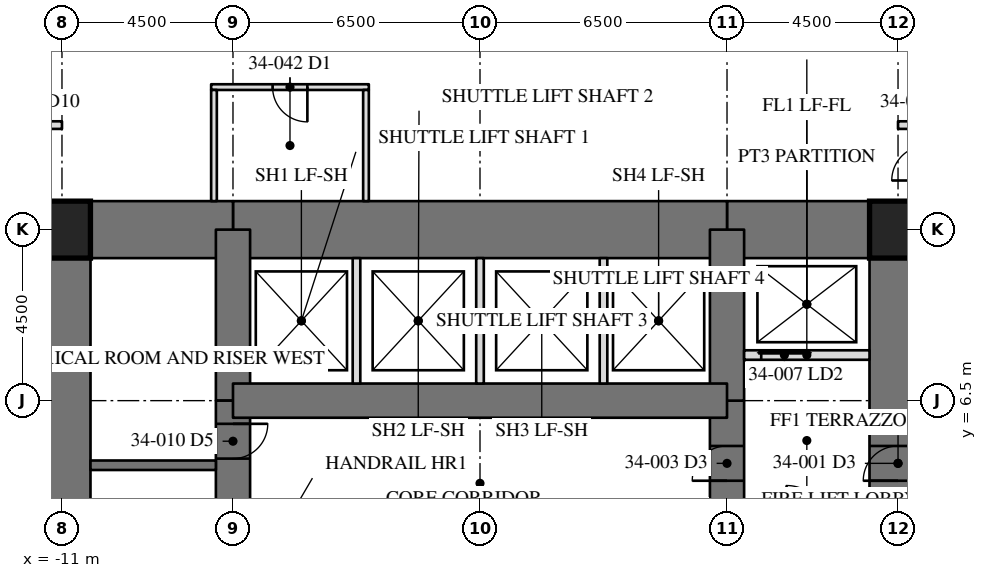
"""IFC4 building model, lengths in metres.
Left out: names, types, materials, properties, quantities, classifications, styles, units other than length and angle.
Written with IfcOpenShell. Run it as: python <this file> out.ifc"""

import sys

from ifc_helpers import new_model, si_unit, direction, frame, frame_2d, origin, origin_2d, place, context, subcontext, project, spatial, rectangle, hollow_rectangle, extrude, element, fill, save


model = new_model("IFC4")
c1 = context("Model", 3, precision=1e-05, world=origin(), true_north=direction((0.0, 1.0)))
c2 = subcontext(c1, "Body", "Model", "MODEL_VIEW")
j1 = project(units=[si_unit("LENGTHUNIT", "METRE"), si_unit("PLANEANGLEUNIT", "RADIAN")], contexts=[c1])
p1 = place(None, origin())
s1 = spatial("IfcSite", under=j1, at=p1, CompositionType="ELEMENT")
p2 = place(p1, origin())
s2 = spatial("IfcBuilding", under=s1, at=p2, CompositionType="ELEMENT")
p3 = place(p2, frame((0.0, 0.0, 145.9)))
s3 = spatial("IfcBuildingStorey", under=s2, at=p3, CompositionType="ELEMENT", Elevation=145.9)
p4 = place(p3, frame((11.0, -11.0, 0.0), z_axis=(0.0, 0.0, 1.0), x_axis=(0.0, 1.0, 0.0)))
e1 = element("IfcWall", 1, at=p4, inside=s3, PredefinedType="SHEAR", context=c2, shape_type="SweptSolid", body=[
    extrude(rectangle(XDim=22.0, YDim=1.5, at=frame_2d((11.0, 0.0))), origin(), (0.0, 0.0, 1.0), 4.1),
])
p5 = place(p4, frame((15.393, 0.0, 0.0)))
e2 = element("IfcOpeningElement", 2, at=p5, cuts=e1, PredefinedType="OPENING", context=c2, shape_type="SweptSolid", body=[
    extrude(rectangle(XDim=0.915, YDim=2.134, at=frame_2d((0.458, 1.067))), frame((0.0, 0.76, 0.0), z_axis=(0.0, -1.0, 0.0), x_axis=(1.0, 0.0, 0.0)), (0.0, 0.0, 1.0), 1.52),
])
p6 = place(p3, frame((-11.0, 11.0, 0.0), z_axis=(0.0, 0.0, 1.0), x_axis=(0.0, -1.0, 0.0)))
e3 = element("IfcWall", 3, at=p6, inside=s3, PredefinedType="SHEAR", context=c2, shape_type="SweptSolid", body=[
    extrude(rectangle(XDim=22.0, YDim=1.5, at=frame_2d((11.0, 0.0))), origin(), (0.0, 0.0, 1.0), 4.1),
])
p7 = place(p6, frame((15.393, 0.0, 0.0)))
e4 = element("IfcOpeningElement", 4, at=p7, cuts=e3, PredefinedType="OPENING", context=c2, shape_type="SweptSolid", body=[
    extrude(rectangle(XDim=0.915, YDim=2.134, at=frame_2d((0.458, 1.067))), frame((0.0, 0.76, 0.0), z_axis=(0.0, -1.0, 0.0), x_axis=(1.0, 0.0, 0.0)), (0.0, 0.0, 1.0), 1.52),
])
p8 = place(p3, frame((11.0, 11.0, 0.0), z_axis=(0.0, 0.0, 1.0), x_axis=(-1.0, 0.0, 0.0)))
e5 = element("IfcWall", 5, at=p8, inside=s3, PredefinedType="SHEAR", context=c2, shape_type="SweptSolid", body=[
    extrude(rectangle(XDim=4.5, YDim=1.5, at=frame_2d((2.25, 0.0))), origin(), (0.0, 0.0, 1.0), 4.1),
])
p9 = place(p3, frame((6.5, 11.0, 0.0), z_axis=(0.0, 0.0, 1.0), x_axis=(-1.0, 0.0, 0.0)))
e6 = element("IfcWall", 6, at=p9, inside=s3, PredefinedType="SHEAR", context=c2, shape_type="SweptSolid", body=[
    extrude(rectangle(XDim=13.0, YDim=1.5, at=frame_2d((6.5, 0.0))), origin(), (0.0, 0.0, 1.0), 4.1),
])
p10 = place(p3, frame((-6.5, 11.0, 0.0), z_axis=(0.0, 0.0, 1.0), x_axis=(-1.0, 0.0, 0.0)))
e7 = element("IfcWall", 7, at=p10, inside=s3, PredefinedType="SHEAR", context=c2, shape_type="SweptSolid", body=[
    extrude(rectangle(XDim=4.5, YDim=1.5, at=frame_2d((2.25, 0.0))), origin(), (0.0, 0.0, 1.0), 4.1),
])
p11 = place(p3, frame((6.5, -6.5, 0.0), z_axis=(0.0, 0.0, 1.0), x_axis=(0.0, 1.0, 0.0)))
e8 = element("IfcWall", 8, at=p11, inside=s3, PredefinedType="SHEAR", context=c2, shape_type="SweptSolid", body=[
    extrude(rectangle(XDim=13.0, YDim=0.9, at=frame_2d((6.5, 0.0))), origin(), (0.0, 0.0, 1.0), 4.1),
])
p12 = place(p11, frame((10.893, 0.0, 0.0)))
e9 = element("IfcOpeningElement", 9, at=p12, cuts=e8, PredefinedType="OPENING", context=c2, shape_type="SweptSolid", body=[
    extrude(rectangle(XDim=0.915, YDim=2.134, at=frame_2d((0.458, 1.067))), frame((0.0, 0.46, 0.0), z_axis=(0.0, -1.0, 0.0), x_axis=(1.0, 0.0, 0.0)), (0.0, 0.0, 1.0), 0.92),
])
p13 = place(p11, frame((0.61, 0.0, 0.0)))
e10 = element("IfcOpeningElement", 10, at=p13, cuts=e8, PredefinedType="OPENING", context=c2, shape_type="SweptSolid", body=[
    extrude(rectangle(XDim=0.915, YDim=2.134, at=frame_2d((0.458, 1.067))), frame((0.0, 0.46, 0.0), z_axis=(0.0, -1.0, 0.0), x_axis=(1.0, 0.0, 0.0)), (0.0, 0.0, 1.0), 0.92),
])
for number, where, z_axis, x_axis in (
    (11, (6.5, 6.5, 0.0), (0.0, 0.0, 1.0), (0.0, 1.0, 0.0)),
    (12, (-6.5, 11.0, 0.0), (0.0, 0.0, 1.0), (0.0, -1.0, 0.0)),
):
    element("IfcWall", number, at=place(p3, frame(where, z_axis=z_axis, x_axis=x_axis)), inside=s3, PredefinedType="SHEAR", context=c2, shape_type="SweptSolid", body=[
        extrude(rectangle(XDim=4.5, YDim=0.9, at=frame_2d((2.25, 0.0))), origin(), (0.0, 0.0, 1.0), 4.1),
    ])
p14 = place(p3, frame((-6.5, 6.5, 0.0), z_axis=(0.0, 0.0, 1.0), x_axis=(0.0, -1.0, 0.0)))
e13 = element("IfcWall", 13, at=p14, inside=s3, PredefinedType="SHEAR", context=c2, shape_type="SweptSolid", body=[
    extrude(rectangle(XDim=13.0, YDim=0.9, at=frame_2d((6.5, 0.0))), origin(), (0.0, 0.0, 1.0), 4.1),
])
p15 = place(p14, frame((10.893, 0.0, 0.0)))
e14 = element("IfcOpeningElement", 14, at=p15, cuts=e13, PredefinedType="OPENING", context=c2, shape_type="SweptSolid", body=[
    extrude(rectangle(XDim=0.915, YDim=2.134, at=frame_2d((0.458, 1.067))), frame((0.0, 0.46, 0.0), z_axis=(0.0, -1.0, 0.0), x_axis=(1.0, 0.0, 0.0)), (0.0, 0.0, 1.0), 0.92),
])
p16 = place(p14, frame((0.61, 0.0, 0.0)))
e15 = element("IfcOpeningElement", 15, at=p16, cuts=e13, PredefinedType="OPENING", context=c2, shape_type="SweptSolid", body=[
    extrude(rectangle(XDim=0.915, YDim=2.134, at=frame_2d((0.458, 1.067))), frame((0.0, 0.46, 0.0), z_axis=(0.0, -1.0, 0.0), x_axis=(1.0, 0.0, 0.0)), (0.0, 0.0, 1.0), 0.92),
])
p17 = place(p3, frame((6.5, 6.5, 0.0), z_axis=(0.0, 0.0, 1.0), x_axis=(-1.0, 0.0, 0.0)))
e16 = element("IfcWall", 16, at=p17, inside=s3, PredefinedType="SHEAR", context=c2, shape_type="SweptSolid", body=[
    extrude(rectangle(XDim=13.0, YDim=0.9, at=frame_2d((6.5, 0.0))), origin(), (0.0, 0.0, 1.0), 4.1),
])
for number, where, z_axis, x_axis in (
    (17, (11.0, 11.0, 0.0), (0.0, 0.0, 1.0), (1.0, 0.0, 0.0)),
    (18, (-11.0, 11.0, 0.0), (0.0, 0.0, 1.0), (1.0, 0.0, 0.0)),
):
    element("IfcColumn", number, at=place(p3, frame(where, z_axis=z_axis, x_axis=x_axis)), inside=s3, PredefinedType="COLUMN", context=c2, shape_type="SweptSolid", body=[
        extrude(hollow_rectangle(XDim=1.499, YDim=1.499, WallThickness=0.102, at=origin_2d()), origin(), (0.0, 0.0, 1.0), 4.1),
    ])
p18 = place(p3, frame((-6.95, 4.8, 0.0), z_axis=(0.0, 0.0, 1.0), x_axis=(-1.0, 0.0, 0.0)))
e19 = element("IfcWall", 19, at=p18, inside=s3, PredefinedType="SOLIDWALL", context=c2, shape_type="SweptSolid", body=[
    extrude(rectangle(XDim=3.3, YDim=0.25, at=frame_2d((1.65, 0.0))), origin(), (0.0, 0.0, 1.0), 3.91),
])
p19 = place(p3, frame((6.95, 7.7, 0.0), z_axis=(0.0, 0.0, 1.0), x_axis=(1.0, 0.0, 0.0)))
e20 = element("IfcWall", 20, at=p19, inside=s3, PredefinedType="PARTITIONING", context=c2, shape_type="SweptSolid", body=[
    extrude(rectangle(XDim=3.3, YDim=0.25, at=frame_2d((1.65, 0.0))), origin(), (0.0, 0.0, 1.0), 3.91),
])
p20 = place(p19, frame((0.45, 0.0, 0.0)))
e21 = element("IfcOpeningElement", 21, at=p20, cuts=e20, PredefinedType="OPENING", context=c2, shape_type="SweptSolid", body=[
    extrude(rectangle(XDim=1.219, YDim=2.134, at=frame_2d((0.609, 1.067))), frame((0.0, 0.135, 0.0), z_axis=(0.0, -1.0, 0.0), x_axis=(1.0, 0.0, 0.0)), (0.0, 0.0, 1.0), 0.27),
])
for number, where, z_axis, x_axis in (
    (22, (-3.25, 6.95, 0.0), (0.0, 0.0, 1.0), (0.0, 1.0, 0.0)),
    (23, (0.0, 6.95, 0.0), (0.0, 0.0, 1.0), (0.0, 1.0, 0.0)),
    (24, (3.25, 6.95, 0.0), (0.0, 0.0, 1.0), (0.0, 1.0, 0.0)),
):
    element("IfcWall", number, at=place(p3, frame(where, z_axis=z_axis, x_axis=x_axis)), inside=s3, PredefinedType="PARTITIONING", context=c2, shape_type="SweptSolid", body=[
        extrude(rectangle(XDim=3.3, YDim=0.2, at=frame_2d((1.65, 0.0))), origin(), (0.0, 0.0, 1.0), 3.91),
    ])
for number, where, z_axis, x_axis in (
    (25, (11.0, 13.75, 0.0), (0.0, 0.0, 1.0), (1.0, 0.0, 0.0)),
    (26, (-11.0, 13.75, 0.0), (0.0, 0.0, 1.0), (-1.0, 0.0, 0.0)),
):
    element("IfcWall", number, at=place(p3, frame(where, z_axis=z_axis, x_axis=x_axis)), inside=s3, PredefinedType="PARTITIONING", context=c2, shape_type="SweptSolid", body=[
        extrude(rectangle(XDim=2.85, YDim=0.2, at=frame_2d((1.425, 0.0))), origin(), (0.0, 0.0, 1.0), 3.91),
    ])
p21 = place(p3, frame((-2.925, 14.75, 0.0), z_axis=(0.0, 0.0, 1.0), x_axis=(-1.0, 0.0, 0.0)))
e27 = element("IfcWall", 27, at=p21, inside=s3, PredefinedType="PARTITIONING", context=c2, shape_type="SweptSolid", body=[
    extrude(rectangle(XDim=4.15, YDim=0.15, at=frame_2d((2.075, 0.0))), origin(), (0.0, 0.0, 1.0), 3.91),
])
p22 = place(p21, frame((1.617, 0.0, 0.0)))
e28 = element("IfcOpeningElement", 28, at=p22, cuts=e27, PredefinedType="OPENING", context=c2, shape_type="SweptSolid", body=[
    extrude(rectangle(XDim=0.915, YDim=2.134, at=frame_2d((0.458, 1.067))), frame((0.0, 0.085, 0.0), z_axis=(0.0, -1.0, 0.0), x_axis=(1.0, 0.0, 0.0)), (0.0, 0.0, 1.0), 0.17),
])
for number, where, z_axis, x_axis in (
    (29, (-3.0, 14.675, 0.0), (0.0, 0.0, 1.0), (0.0, -1.0, 0.0)),
    (30, (-7.0, 14.675, 0.0), (0.0, 0.0, 1.0), (0.0, -1.0, 0.0)),
):
    element("IfcWall", number, at=place(p3, frame(where, z_axis=z_axis, x_axis=x_axis)), inside=s3, PredefinedType="PARTITIONING", context=c2, shape_type="SweptSolid", body=[
        extrude(rectangle(XDim=2.925, YDim=0.15, at=frame_2d((1.462, 0.0))), origin(), (0.0, 0.0, 1.0), 3.91),
    ])
p23 = place(p12, origin())
e31 = element("IfcDoor", 31, at=p23, inside=s3, OperationType="SINGLE_SWING_RIGHT", PredefinedType="DOOR", context=c2, shape_type="SweptSolid", body=[
    extrude(rectangle(XDim=0.915, YDim=2.134, at=frame_2d((0.458, 1.067))), frame((0.0, -0.375, 0.0), z_axis=(0.0, -1.0, 0.0), x_axis=(1.0, 0.0, 0.0)), (0.0, 0.0, 1.0), 0.05),
])
fill(e9, e31)
p24 = place(p20, origin())
e32 = element("IfcDoor", 32, at=p24, inside=s3, OperationType="SLIDING_TO_LEFT", PredefinedType="DOOR", context=c2, shape_type="SweptSolid", body=[
    extrude(rectangle(XDim=1.219, YDim=2.134, at=frame_2d((0.609, 1.067))), frame((0.0, 0.025, 0.0), z_axis=(0.0, -1.0, 0.0), x_axis=(1.0, 0.0, 0.0)), (0.0, 0.0, 1.0), 0.05),
])
fill(e21, e32)
p25 = place(p16, origin())
e33 = element("IfcDoor", 33, at=p25, inside=s3, OperationType="SINGLE_SWING_RIGHT", PredefinedType="DOOR", context=c2, shape_type="SweptSolid", body=[
    extrude(rectangle(XDim=0.915, YDim=2.134, at=frame_2d((0.458, 1.067))), frame((0.0, -0.375, 0.0), z_axis=(0.0, -1.0, 0.0), x_axis=(1.0, 0.0, 0.0)), (0.0, 0.0, 1.0), 0.05),
])
fill(e15, e33)
p26 = place(p22, origin())
e34 = element("IfcDoor", 34, at=p26, inside=s3, OperationType="SINGLE_SWING_LEFT", PredefinedType="DOOR", context=c2, shape_type="SweptSolid", body=[
    extrude(rectangle(XDim=0.915, YDim=2.134, at=frame_2d((0.458, 1.067))), frame((0.0, 0.025, 0.0), z_axis=(0.0, -1.0, 0.0), x_axis=(1.0, 0.0, 0.0)), (0.0, 0.0, 1.0), 0.05),
])
fill(e28, e34)
save(model, sys.argv[1])
